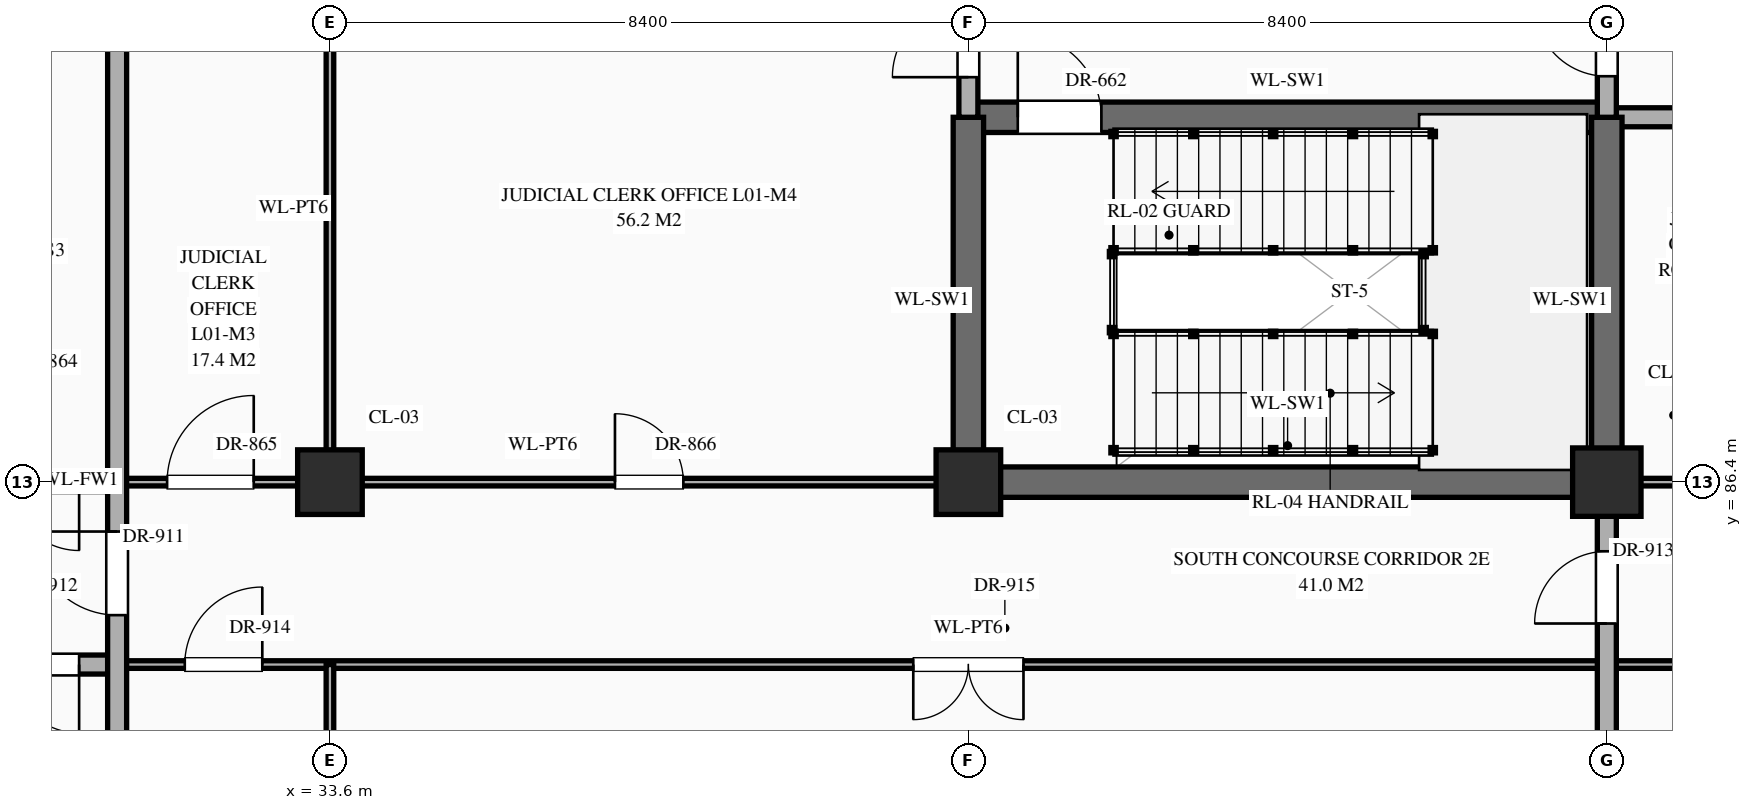
"""IFC4 building model, lengths in metres.
Left out: names, types, materials, properties, quantities, classifications, styles, units other than length and angle.
Written with IfcOpenShell. Run it as: python <this file> out.ifc"""

import sys

from ifc_helpers import new_model, si_unit, direction, frame, frame_2d, origin, origin_2d, place, context, subcontext, project, spatial, rectangle, extrude, element, fill, save


model = new_model("IFC4")
c1 = context("Model", 3, precision=1e-05, world=origin(), true_north=direction((0.0, 1.0)))
c2 = subcontext(c1, "Body", "Model", "MODEL_VIEW")
j1 = project(units=[si_unit("LENGTHUNIT", "METRE"), si_unit("PLANEANGLEUNIT", "RADIAN")], contexts=[c1])
p1 = place(None, origin())
s1 = spatial("IfcSite", under=j1, at=p1, CompositionType="ELEMENT")
p2 = place(p1, origin())
s2 = spatial("IfcBuilding", under=s1, at=p2, CompositionType="ELEMENT")
p3 = place(p2, origin())
s3 = spatial("IfcBuildingStorey", under=s2, at=p3, CompositionType="ELEMENT", Elevation=0.0)
for number, where, z_axis, x_axis in (
    (1, (33.6, 86.4, 0.0), (0.0, 0.0, 1.0), (1.0, 0.0, 0.0)),
    (2, (42.0, 86.4, 0.0), (0.0, 0.0, 1.0), (1.0, 0.0, 0.0)),
):
    element("IfcColumn", number, at=place(p3, frame(where, z_axis=z_axis, x_axis=x_axis)), inside=s3, PredefinedType="COLUMN", context=c2, shape_type="SweptSolid", body=[
        extrude(rectangle(XDim=0.85, YDim=0.85, at=origin_2d()), origin(), (0.0, 0.0, 1.0), 5.4),
    ])
p4 = place(p3, frame((50.4, 86.4, 0.0), z_axis=(0.0, 0.0, 1.0), x_axis=(1.0, 0.0, 0.0)))
e3 = element("IfcColumn", 3, at=p4, inside=s3, PredefinedType="COLUMN", context=c2, shape_type="SweptSolid", body=[
    extrude(rectangle(XDim=0.9, YDim=0.9, at=origin_2d()), origin(), (0.0, 0.0, 1.0), 5.4),
])
p5 = place(p3, frame((28.0, 84.0, 0.0), z_axis=(0.0, 0.0, 1.0), x_axis=(1.0, 0.0, 0.0)))
e4 = element("IfcWall", 4, at=p5, inside=s3, PredefinedType="STANDARD", context=c2, shape_type="SweptSolid", body=[
    extrude(rectangle(XDim=2.8, YDim=0.25, at=frame_2d((1.4, 0.0))), origin(), (0.0, 0.0, 1.0), 5.12),
])
p6 = place(p5, frame((0.5, 0.0, 0.0)))
e5 = element("IfcOpeningElement", 5, at=p6, cuts=e4, PredefinedType="OPENING", context=c2, shape_type="SweptSolid", body=[
    extrude(rectangle(XDim=1.8, YDim=2.35, at=frame_2d((0.9, 1.175))), frame((0.0, 0.137, 0.0), z_axis=(0.0, -1.0, 0.0), x_axis=(1.0, 0.0, 0.0)), (0.0, 0.0, 1.0), 0.274),
])
p7 = place(p3, frame((30.8, 84.0, 0.0), z_axis=(0.0, 0.0, 1.0), x_axis=(1.0, 0.0, 0.0)))
e6 = element("IfcWall", 6, at=p7, inside=s3, PredefinedType="STANDARD", context=c2, shape_type="SweptSolid", body=[
    extrude(rectangle(XDim=22.4, YDim=0.1, at=frame_2d((11.2, 0.0))), origin(), (0.0, 0.0, 1.0), 5.12),
])
p8 = place(p7, frame((0.89, 0.0, 0.0)))
e7 = element("IfcOpeningElement", 7, at=p8, cuts=e6, PredefinedType="OPENING", context=c2, shape_type="SweptSolid", body=[
    extrude(rectangle(XDim=1.02, YDim=2.4, at=frame_2d((0.51, 1.2))), frame((0.0, 0.062, 0.0), z_axis=(0.0, -1.0, 0.0), x_axis=(1.0, 0.0, 0.0)), (0.0, 0.0, 1.0), 0.124),
])
p9 = place(p7, frame((10.475, 0.0, 0.0)))
e8 = element("IfcOpeningElement", 8, at=p9, cuts=e6, PredefinedType="OPENING", context=c2, shape_type="SweptSolid", body=[
    extrude(rectangle(XDim=1.45, YDim=2.3, at=frame_2d((0.725, 1.15))), frame((0.0, 0.062, 0.0), z_axis=(0.0, -1.0, 0.0), x_axis=(1.0, 0.0, 0.0)), (0.0, 0.0, 1.0), 0.124),
])
p10 = place(p7, frame((20.55, 0.0, 0.0)))
e9 = element("IfcOpeningElement", 9, at=p10, cuts=e6, PredefinedType="OPENING", context=c2, shape_type="SweptSolid", body=[
    extrude(rectangle(XDim=0.9, YDim=2.15, at=frame_2d((0.45, 1.075))), frame((0.0, 0.062, 0.0), z_axis=(0.0, -1.0, 0.0), x_axis=(1.0, 0.0, 0.0)), (0.0, 0.0, 1.0), 0.124),
])
p11 = place(p3, frame((28.0, 86.4, 0.0), z_axis=(0.0, 0.0, 1.0), x_axis=(1.0, 0.0, 0.0)))
e10 = element("IfcWall", 10, at=p11, inside=s3, PredefinedType="STANDARD", context=c2, shape_type="SweptSolid", body=[
    extrude(rectangle(XDim=2.8, YDim=0.25, at=frame_2d((1.4, 0.0))), origin(), (0.0, 0.0, 1.0), 4.27),
])
p12 = place(p11, frame((0.5, 0.0, 0.0)))
e11 = element("IfcOpeningElement", 11, at=p12, cuts=e10, PredefinedType="OPENING", context=c2, shape_type="SweptSolid", body=[
    extrude(rectangle(XDim=1.8, YDim=2.35, at=frame_2d((0.9, 1.175))), frame((0.0, 0.137, 0.0), z_axis=(0.0, -1.0, 0.0), x_axis=(1.0, 0.0, 0.0)), (0.0, 0.0, 1.0), 0.274),
])
p13 = place(p3, frame((30.8, 86.4, 0.0), z_axis=(0.0, 0.0, 1.0), x_axis=(1.0, 0.0, 0.0)))
e12 = element("IfcWall", 12, at=p13, inside=s3, PredefinedType="STANDARD", context=c2, shape_type="SweptSolid", body=[
    extrude(rectangle(XDim=11.2, YDim=0.1, at=frame_2d((5.6, 0.0))), origin(), (0.0, 0.0, 1.0), 4.27),
])
p14 = place(p13, frame((0.657, 0.0, 0.0)))
e13 = element("IfcOpeningElement", 13, at=p14, cuts=e12, PredefinedType="OPENING", context=c2, shape_type="SweptSolid", body=[
    extrude(rectangle(XDim=1.14, YDim=2.4, at=frame_2d((0.57, 1.2))), frame((0.0, 0.062, 0.0), z_axis=(0.0, -1.0, 0.0), x_axis=(1.0, 0.0, 0.0)), (0.0, 0.0, 1.0), 0.124),
])
p15 = place(p13, frame((6.55, 0.0, 0.0)))
e14 = element("IfcOpeningElement", 14, at=p15, cuts=e12, PredefinedType="OPENING", context=c2, shape_type="SweptSolid", body=[
    extrude(rectangle(XDim=0.9, YDim=2.15, at=frame_2d((0.45, 1.075))), frame((0.0, 0.062, 0.0), z_axis=(0.0, -1.0, 0.0), x_axis=(1.0, 0.0, 0.0)), (0.0, 0.0, 1.0), 0.124),
])
p16 = place(p3, frame((42.0, 86.4, 0.0), z_axis=(0.0, 0.0, 1.0), x_axis=(1.0, 0.0, 0.0)))
e15 = element("IfcWall", 15, at=p16, inside=s3, PredefinedType="SHEAR", context=c2, shape_type="SweptSolid", body=[
    extrude(rectangle(XDim=8.4, YDim=0.4, at=frame_2d((4.2, 0.0))), origin(), (0.0, 0.0, 1.0), 5.12),
])
p17 = place(p3, frame((50.4, 86.4, 0.0), z_axis=(0.0, 0.0, 1.0), x_axis=(1.0, 0.0, 0.0)))
e16 = element("IfcWall", 16, at=p17, inside=s3, PredefinedType="STANDARD", context=c2, shape_type="SweptSolid", body=[
    extrude(rectangle(XDim=2.8, YDim=0.1, at=frame_2d((1.4, 0.0))), origin(), (0.0, 0.0, 1.0), 4.27),
])
p18 = place(p17, frame((1.155, 0.0, 0.0)))
e17 = element("IfcOpeningElement", 17, at=p18, cuts=e16, PredefinedType="OPENING", context=c2, shape_type="SweptSolid", body=[
    extrude(rectangle(XDim=0.86, YDim=2.1, at=frame_2d((0.43, 1.05))), frame((0.0, 0.062, 0.0), z_axis=(0.0, -1.0, 0.0), x_axis=(1.0, 0.0, 0.0)), (0.0, 0.0, 1.0), 0.124),
])
p19 = place(p3, frame((42.0, 91.2, 0.0), z_axis=(0.0, 0.0, 1.0), x_axis=(1.0, 0.0, 0.0)))
e18 = element("IfcWall", 18, at=p19, inside=s3, PredefinedType="SHEAR", context=c2, shape_type="SweptSolid", body=[
    extrude(rectangle(XDim=8.4, YDim=0.4, at=frame_2d((4.2, 0.0))), origin(), (0.0, 0.0, 1.0), 5.12),
])
p20 = place(p19, frame((0.65, 0.0, 0.0)))
e19 = element("IfcOpeningElement", 19, at=p20, cuts=e18, PredefinedType="OPENING", context=c2, shape_type="SweptSolid", body=[
    extrude(rectangle(XDim=1.1, YDim=2.2, at=frame_2d((0.55, 1.1))), frame((0.0, 0.212, 0.0), z_axis=(0.0, -1.0, 0.0), x_axis=(1.0, 0.0, 0.0)), (0.0, 0.0, 1.0), 0.424),
])
p21 = place(p3, frame((50.4, 91.2, 0.0), z_axis=(0.0, 0.0, 1.0), x_axis=(1.0, 0.0, 0.0)))
e20 = element("IfcWall", 20, at=p21, inside=s3, PredefinedType="STANDARD", context=c2, shape_type="SweptSolid", body=[
    extrude(rectangle(XDim=2.8, YDim=0.25, at=frame_2d((1.4, 0.0))), origin(), (0.0, 0.0, 1.0), 5.12),
])
p22 = place(p3, frame((30.8, 79.24, 0.0), z_axis=(0.0, 0.0, 1.0), x_axis=(0.0, 1.0, 0.0)))
e21 = element("IfcWall", 21, at=p22, inside=s3, PredefinedType="STANDARD", context=c2, shape_type="SweptSolid", body=[
    extrude(rectangle(XDim=14.36, YDim=0.25, at=frame_2d((7.18, 0.0))), origin(), (0.0, 0.0, 1.0), 5.12),
])
p23 = place(p22, frame((5.41, 0.0, 0.0)))
e22 = element("IfcOpeningElement", 22, at=p23, cuts=e21, PredefinedType="OPENING", context=c2, shape_type="SweptSolid", body=[
    extrude(rectangle(XDim=1.1, YDim=2.2, at=frame_2d((0.55, 1.1))), frame((0.0, 0.137, 0.0), z_axis=(0.0, -1.0, 0.0), x_axis=(1.0, 0.0, 0.0)), (0.0, 0.0, 1.0), 0.274),
])
p24 = place(p3, frame((33.6, 79.24, 0.0), z_axis=(0.0, 0.0, 1.0), x_axis=(0.0, 1.0, 0.0)))
e23 = element("IfcWall", 23, at=p24, inside=s3, PredefinedType="STANDARD", context=c2, shape_type="SweptSolid", body=[
    extrude(rectangle(XDim=4.76, YDim=0.1, at=frame_2d((2.38, 0.0))), origin(), (0.0, 0.0, 1.0), 4.37),
])
p25 = place(p3, frame((33.6, 86.4, 0.0), z_axis=(0.0, 0.0, 1.0), x_axis=(0.0, 1.0, 0.0)))
e24 = element("IfcWall", 24, at=p25, inside=s3, PredefinedType="STANDARD", context=c2, shape_type="SweptSolid", body=[
    extrude(rectangle(XDim=7.2, YDim=0.1, at=frame_2d((3.6, 0.0))), origin(), (0.0, 0.0, 1.0), 4.37),
])
p26 = place(p3, frame((42.0, 86.4, 0.0), z_axis=(0.0, 0.0, 1.0), x_axis=(0.0, 1.0, 0.0)))
e25 = element("IfcWall", 25, at=p26, inside=s3, PredefinedType="SHEAR", context=c2, shape_type="SweptSolid", body=[
    extrude(rectangle(XDim=4.8, YDim=0.4, at=frame_2d((2.4, 0.0))), origin(), (0.0, 0.0, 1.0), 5.12),
])
p27 = place(p3, frame((42.0, 91.2, 0.0), z_axis=(0.0, 0.0, 1.0), x_axis=(0.0, 1.0, 0.0)))
e26 = element("IfcWall", 26, at=p27, inside=s3, PredefinedType="STANDARD", context=c2, shape_type="SweptSolid", body=[
    extrude(rectangle(XDim=2.4, YDim=0.25, at=frame_2d((1.2, 0.0))), origin(), (0.0, 0.0, 1.0), 4.37),
])
p28 = place(p27, frame((0.528, 0.0, 0.0)))
e27 = element("IfcOpeningElement", 27, at=p28, cuts=e26, PredefinedType="OPENING", context=c2, shape_type="SweptSolid", body=[
    extrude(rectangle(XDim=1.0, YDim=2.2, at=frame_2d((0.5, 1.1))), frame((0.0, 0.137, 0.0), z_axis=(0.0, -1.0, 0.0), x_axis=(1.0, 0.0, 0.0)), (0.0, 0.0, 1.0), 0.274),
])
p29 = place(p3, frame((50.4, 79.24, 0.0), z_axis=(0.0, 0.0, 1.0), x_axis=(0.0, 1.0, 0.0)))
e28 = element("IfcWall", 28, at=p29, inside=s3, PredefinedType="STANDARD", context=c2, shape_type="SweptSolid", body=[
    extrude(rectangle(XDim=7.16, YDim=0.25, at=frame_2d((3.58, 0.0))), origin(), (0.0, 0.0, 1.0), 4.37),
])
p30 = place(p29, frame((5.3, 0.0, 0.0)))
e29 = element("IfcOpeningElement", 29, at=p30, cuts=e28, PredefinedType="OPENING", context=c2, shape_type="SweptSolid", body=[
    extrude(rectangle(XDim=0.95, YDim=2.15, at=frame_2d((0.475, 1.075))), frame((0.0, 0.137, 0.0), z_axis=(0.0, -1.0, 0.0), x_axis=(1.0, 0.0, 0.0)), (0.0, 0.0, 1.0), 0.274),
])
p31 = place(p3, frame((50.4, 86.4, 0.0), z_axis=(0.0, 0.0, 1.0), x_axis=(0.0, 1.0, 0.0)))
e30 = element("IfcWall", 30, at=p31, inside=s3, PredefinedType="SHEAR", context=c2, shape_type="SweptSolid", body=[
    extrude(rectangle(XDim=4.8, YDim=0.4, at=frame_2d((2.4, 0.0))), origin(), (0.0, 0.0, 1.0), 5.12),
])
p32 = place(p3, frame((50.4, 91.2, 0.0), z_axis=(0.0, 0.0, 1.0), x_axis=(0.0, 1.0, 0.0)))
e31 = element("IfcWall", 31, at=p32, inside=s3, PredefinedType="STANDARD", context=c2, shape_type="SweptSolid", body=[
    extrude(rectangle(XDim=13.2, YDim=0.25, at=frame_2d((6.6, 0.0))), origin(), (0.0, 0.0, 1.0), 4.37),
])
p33 = place(p32, frame((0.54, 0.0, 0.0)))
e32 = element("IfcOpeningElement", 32, at=p33, cuts=e31, PredefinedType="OPENING", context=c2, shape_type="SweptSolid", body=[
    extrude(rectangle(XDim=0.95, YDim=2.15, at=frame_2d((0.475, 1.075))), frame((0.0, 0.137, 0.0), z_axis=(0.0, -1.0, 0.0), x_axis=(1.0, 0.0, 0.0)), (0.0, 0.0, 1.0), 0.274),
])
p34 = place(p32, frame((10.485, 0.0, 0.0)))
e33 = element("IfcOpeningElement", 33, at=p34, cuts=e31, PredefinedType="OPENING", context=c2, shape_type="SweptSolid", body=[
    extrude(rectangle(XDim=1.0, YDim=2.2, at=frame_2d((0.5, 1.1))), frame((0.0, 0.137, 0.0), z_axis=(0.0, -1.0, 0.0), x_axis=(1.0, 0.0, 0.0)), (0.0, 0.0, 1.0), 0.274),
])
p35 = place(p32, frame((3.31, 0.0, 0.0)))
e34 = element("IfcOpeningElement", 34, at=p35, cuts=e31, PredefinedType="OPENING", context=c2, shape_type="SweptSolid", body=[
    extrude(rectangle(XDim=0.95, YDim=2.15, at=frame_2d((0.475, 1.075))), frame((0.0, 0.137, 0.0), z_axis=(0.0, -1.0, 0.0), x_axis=(1.0, 0.0, 0.0)), (0.0, 0.0, 1.0), 0.274),
])
p36 = place(p20, origin())
e35 = element("IfcDoor", 35, at=p36, inside=s3, OperationType="SINGLE_SWING_LEFT", PredefinedType="DOOR", context=c2, shape_type="SweptSolid", body=[
    extrude(rectangle(XDim=1.1, YDim=2.2, at=frame_2d((0.55, 1.1))), frame((0.0, 0.025, 0.0), z_axis=(0.0, -1.0, 0.0), x_axis=(1.0, 0.0, 0.0)), (0.0, 0.0, 1.0), 0.05),
])
fill(e19, e35)
p37 = place(p28, origin())
e36 = element("IfcDoor", 36, at=p37, inside=s3, OperationType="SINGLE_SWING_LEFT", PredefinedType="DOOR", context=c2, shape_type="SweptSolid", body=[
    extrude(rectangle(XDim=1.0, YDim=2.2, at=frame_2d((0.5, 1.1))), frame((0.0, 0.025, 0.0), z_axis=(0.0, -1.0, 0.0), x_axis=(1.0, 0.0, 0.0)), (0.0, 0.0, 1.0), 0.05),
])
fill(e27, e36)
p38 = place(p33, origin())
e37 = element("IfcDoor", 37, at=p38, inside=s3, OperationType="SINGLE_SWING_RIGHT", PredefinedType="DOOR", context=c2, shape_type="SweptSolid", body=[
    extrude(rectangle(XDim=0.95, YDim=2.15, at=frame_2d((0.475, 1.075))), frame((0.0, 0.025, 0.0), z_axis=(0.0, -1.0, 0.0), x_axis=(1.0, 0.0, 0.0)), (0.0, 0.0, 1.0), 0.05),
])
fill(e32, e37)
p39 = place(p12, frame((1.8, 0.0, 0.0), z_axis=(0.0, 0.0, 1.0), x_axis=(-1.0, 0.0, 0.0)))
e38 = element("IfcDoor", 38, at=p39, inside=s3, OperationType="DOUBLE_DOOR_SINGLE_SWING", PredefinedType="DOOR", context=c2, shape_type="SweptSolid", body=[
    extrude(rectangle(XDim=1.8, YDim=2.35, at=frame_2d((0.9, 1.175))), frame((0.0, 0.025, 0.0), z_axis=(0.0, -1.0, 0.0), x_axis=(1.0, 0.0, 0.0)), (0.0, 0.0, 1.0), 0.05),
])
fill(e11, e38)
p40 = place(p14, origin())
e39 = element("IfcDoor", 39, at=p40, inside=s3, OperationType="SINGLE_SWING_RIGHT", PredefinedType="DOOR", context=c2, shape_type="SweptSolid", body=[
    extrude(rectangle(XDim=1.14, YDim=2.4, at=frame_2d((0.57, 1.2))), frame((0.0, 0.025, 0.0), z_axis=(0.0, -1.0, 0.0), x_axis=(1.0, 0.0, 0.0)), (0.0, 0.0, 1.0), 0.05),
])
fill(e13, e39)
p41 = place(p15, origin())
e40 = element("IfcDoor", 40, at=p41, inside=s3, OperationType="SINGLE_SWING_LEFT", PredefinedType="DOOR", context=c2, shape_type="SweptSolid", body=[
    extrude(rectangle(XDim=0.9, YDim=2.15, at=frame_2d((0.45, 1.075))), frame((0.0, 0.025, 0.0), z_axis=(0.0, -1.0, 0.0), x_axis=(1.0, 0.0, 0.0)), (0.0, 0.0, 1.0), 0.05),
])
fill(e14, e40)
p42 = place(p23, origin())
e41 = element("IfcDoor", 41, at=p42, inside=s3, OperationType="SINGLE_SWING_RIGHT", PredefinedType="DOOR", context=c2, shape_type="SweptSolid", body=[
    extrude(rectangle(XDim=1.1, YDim=2.2, at=frame_2d((0.55, 1.1))), frame((0.0, 0.025, 0.0), z_axis=(0.0, -1.0, 0.0), x_axis=(1.0, 0.0, 0.0)), (0.0, 0.0, 1.0), 0.05),
])
fill(e22, e41)
p43 = place(p6, frame((1.8, 0.0, 0.0), z_axis=(0.0, 0.0, 1.0), x_axis=(-1.0, 0.0, 0.0)))
e42 = element("IfcDoor", 42, at=p43, inside=s3, OperationType="DOUBLE_DOOR_SINGLE_SWING", PredefinedType="DOOR", context=c2, shape_type="SweptSolid", body=[
    extrude(rectangle(XDim=1.8, YDim=2.35, at=frame_2d((0.9, 1.175))), frame((0.0, 0.025, 0.0), z_axis=(0.0, -1.0, 0.0), x_axis=(1.0, 0.0, 0.0)), (0.0, 0.0, 1.0), 0.05),
])
fill(e5, e42)
p44 = place(p30, origin())
e43 = element("IfcDoor", 43, at=p44, inside=s3, OperationType="SINGLE_SWING_LEFT", PredefinedType="DOOR", context=c2, shape_type="SweptSolid", body=[
    extrude(rectangle(XDim=0.95, YDim=2.15, at=frame_2d((0.475, 1.075))), frame((0.0, 0.025, 0.0), z_axis=(0.0, -1.0, 0.0), x_axis=(1.0, 0.0, 0.0)), (0.0, 0.0, 1.0), 0.05),
])
fill(e29, e43)
p45 = place(p8, origin())
e44 = element("IfcDoor", 44, at=p45, inside=s3, OperationType="SINGLE_SWING_RIGHT", PredefinedType="DOOR", context=c2, shape_type="SweptSolid", body=[
    extrude(rectangle(XDim=1.02, YDim=2.4, at=frame_2d((0.51, 1.2))), frame((0.0, 0.025, 0.0), z_axis=(0.0, -1.0, 0.0), x_axis=(1.0, 0.0, 0.0)), (0.0, 0.0, 1.0), 0.05),
])
fill(e7, e44)
p46 = place(p9, frame((1.45, 0.0, 0.0), z_axis=(0.0, 0.0, 1.0), x_axis=(-1.0, 0.0, 0.0)))
e45 = element("IfcDoor", 45, at=p46, inside=s3, OperationType="DOUBLE_DOOR_SINGLE_SWING", PredefinedType="DOOR", context=c2, shape_type="SweptSolid", body=[
    extrude(rectangle(XDim=1.45, YDim=2.3, at=frame_2d((0.725, 1.15))), frame((0.0, 0.025, 0.0), z_axis=(0.0, -1.0, 0.0), x_axis=(1.0, 0.0, 0.0)), (0.0, 0.0, 1.0), 0.05),
])
fill(e8, e45)
save(model, sys.argv[1])
